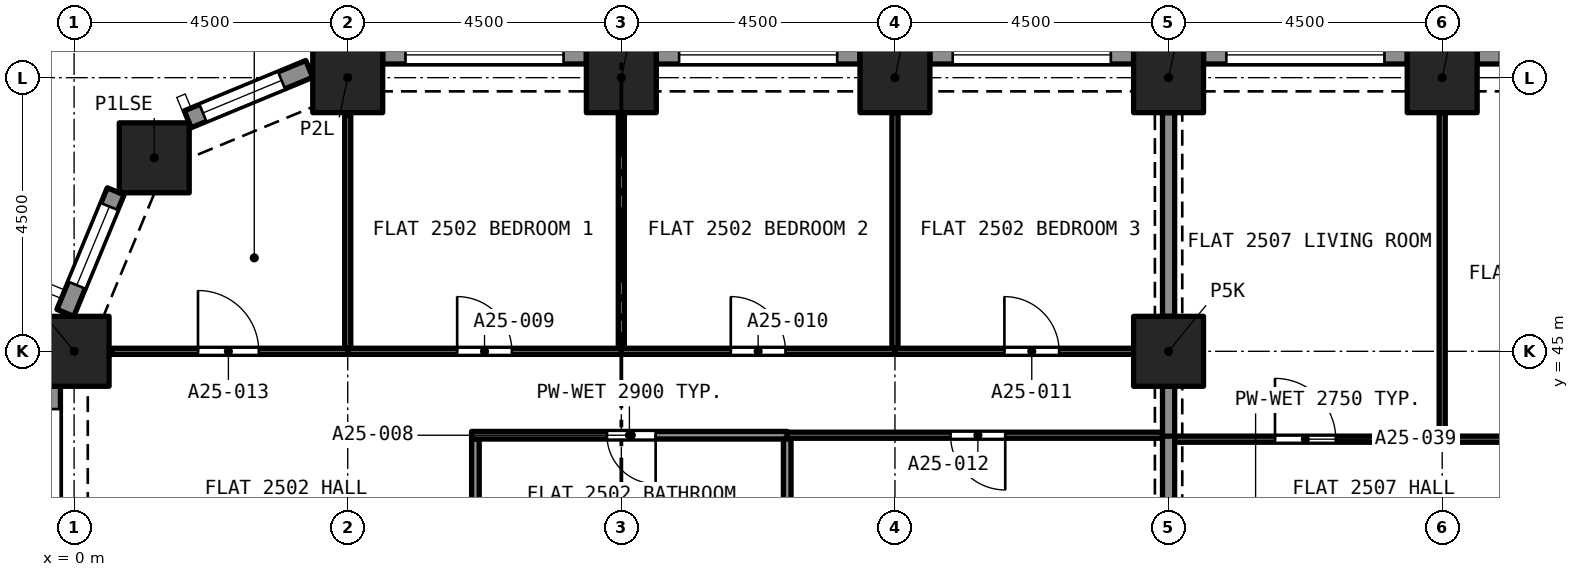
"""IFC4 building model, lengths in metres.
Left out: names, types, materials, properties, quantities, classifications, styles, units other than length and angle.
Written with IfcOpenShell. Run it as: python <this file> out.ifc"""

import sys

from ifc_helpers import new_model, si_unit, direction, frame, frame_2d, origin, origin_2d, place, context, subcontext, project, spatial, rectangle, extrude, element, fill, save


model = new_model("IFC4")
c1 = context("Model", 3, precision=1e-05, world=origin(), true_north=direction((0.0, 1.0)))
c2 = subcontext(c1, "Body", "Model", "MODEL_VIEW")
j1 = project(units=[si_unit("LENGTHUNIT", "METRE"), si_unit("PLANEANGLEUNIT", "RADIAN")], contexts=[c1])
p1 = place(None, origin())
s1 = spatial("IfcSite", under=j1, at=p1, CompositionType="ELEMENT")
p2 = place(p1, origin())
s2 = spatial("IfcBuilding", under=s1, at=p2, CompositionType="ELEMENT")
p3 = place(p2, frame((0.0, 0.0, 92.8)))
s3 = spatial("IfcBuildingStorey", under=s2, at=p3, CompositionType="ELEMENT", Elevation=92.8)
for number, where, z_axis, x_axis in (
    (1, (0.0, 45.0, 0.0), (0.0, 0.0, 1.0), (1.0, 0.0, 0.0)),
    (2, (18.0, 45.0, 0.0), (0.0, 0.0, 1.0), (1.0, 0.0, 0.0)),
    (3, (1.318, 48.182, 0.0), (0.0, 0.0, 1.0), (1.0, 0.0, 0.0)),
    (4, (4.5, 49.5, 0.0), (0.0, 0.0, 1.0), (1.0, 0.0, 0.0)),
    (5, (9.0, 49.5, 0.0), (0.0, 0.0, 1.0), (1.0, 0.0, 0.0)),
    (6, (13.5, 49.5, 0.0), (0.0, 0.0, 1.0), (1.0, 0.0, 0.0)),
    (7, (18.0, 49.5, 0.0), (0.0, 0.0, 1.0), (1.0, 0.0, 0.0)),
    (8, (22.5, 49.5, 0.0), (0.0, 0.0, 1.0), (1.0, 0.0, 0.0)),
):
    element("IfcColumn", number, at=place(p3, frame(where, z_axis=z_axis, x_axis=x_axis)), inside=s3, PredefinedType="COLUMN", context=c2, shape_type="SweptSolid", body=[
        extrude(rectangle(XDim=1.15, YDim=1.15, at=origin_2d()), origin(), (0.0, 0.0, 1.0), 3.2),
    ])
p4 = place(p3, frame((23.075, 49.875, 0.0), z_axis=(0.0, 0.0, 1.0), x_axis=(1.0, 0.0, 0.0)))
e9 = element("IfcWall", 9, at=p4, inside=s3, PredefinedType="SOLIDWALL", context=c2, shape_type="SweptSolid", body=[
    extrude(rectangle(XDim=3.35, YDim=0.3, at=frame_2d((1.675, 0.0))), origin(), (0.0, 0.0, 1.0), 3.2),
])
p5 = place(p4, frame((0.375, 0.0, 0.45)))
e10 = element("IfcOpeningElement", 10, at=p5, cuts=e9, PredefinedType="OPENING", context=c2, shape_type="SweptSolid", body=[
    extrude(rectangle(XDim=2.6, YDim=1.95, at=frame_2d((1.3, 0.975))), frame((0.0, 0.16, 0.0), z_axis=(0.0, -1.0, 0.0), x_axis=(1.0, 0.0, 0.0)), (0.0, 0.0, 1.0), 0.32),
])
p6 = place(p3, frame((18.575, 49.875, 0.0), z_axis=(0.0, 0.0, 1.0), x_axis=(1.0, 0.0, 0.0)))
e11 = element("IfcWall", 11, at=p6, inside=s3, PredefinedType="SOLIDWALL", context=c2, shape_type="SweptSolid", body=[
    extrude(rectangle(XDim=3.35, YDim=0.3, at=frame_2d((1.675, 0.0))), origin(), (0.0, 0.0, 1.0), 3.2),
])
p7 = place(p6, frame((0.375, 0.0, 0.45)))
e12 = element("IfcOpeningElement", 12, at=p7, cuts=e11, PredefinedType="OPENING", context=c2, shape_type="SweptSolid", body=[
    extrude(rectangle(XDim=2.6, YDim=1.95, at=frame_2d((1.3, 0.975))), frame((0.0, 0.16, 0.0), z_axis=(0.0, -1.0, 0.0), x_axis=(1.0, 0.0, 0.0)), (0.0, 0.0, 1.0), 0.32),
])
p8 = place(p3, frame((14.075, 49.875, 0.0), z_axis=(0.0, 0.0, 1.0), x_axis=(1.0, 0.0, 0.0)))
e13 = element("IfcWall", 13, at=p8, inside=s3, PredefinedType="SOLIDWALL", context=c2, shape_type="SweptSolid", body=[
    extrude(rectangle(XDim=3.35, YDim=0.3, at=frame_2d((1.675, 0.0))), origin(), (0.0, 0.0, 1.0), 3.2),
])
p9 = place(p8, frame((0.375, 0.0, 0.45)))
e14 = element("IfcOpeningElement", 14, at=p9, cuts=e13, PredefinedType="OPENING", context=c2, shape_type="SweptSolid", body=[
    extrude(rectangle(XDim=2.6, YDim=1.95, at=frame_2d((1.3, 0.975))), frame((0.0, 0.16, 0.0), z_axis=(0.0, -1.0, 0.0), x_axis=(1.0, 0.0, 0.0)), (0.0, 0.0, 1.0), 0.32),
])
p10 = place(p3, frame((9.575, 49.875, 0.0), z_axis=(0.0, 0.0, 1.0), x_axis=(1.0, 0.0, 0.0)))
e15 = element("IfcWall", 15, at=p10, inside=s3, PredefinedType="SOLIDWALL", context=c2, shape_type="SweptSolid", body=[
    extrude(rectangle(XDim=3.35, YDim=0.3, at=frame_2d((1.675, 0.0))), origin(), (0.0, 0.0, 1.0), 3.2),
])
p11 = place(p10, frame((0.375, 0.0, 0.45)))
e16 = element("IfcOpeningElement", 16, at=p11, cuts=e15, PredefinedType="OPENING", context=c2, shape_type="SweptSolid", body=[
    extrude(rectangle(XDim=2.6, YDim=1.95, at=frame_2d((1.3, 0.975))), frame((0.0, 0.16, 0.0), z_axis=(0.0, -1.0, 0.0), x_axis=(1.0, 0.0, 0.0)), (0.0, 0.0, 1.0), 0.32),
])
p12 = place(p3, frame((5.075, 49.875, 0.0), z_axis=(0.0, 0.0, 1.0), x_axis=(1.0, 0.0, 0.0)))
e17 = element("IfcWall", 17, at=p12, inside=s3, PredefinedType="SOLIDWALL", context=c2, shape_type="SweptSolid", body=[
    extrude(rectangle(XDim=3.35, YDim=0.3, at=frame_2d((1.675, 0.0))), origin(), (0.0, 0.0, 1.0), 3.2),
])
p13 = place(p12, frame((0.375, 0.0, 0.45)))
e18 = element("IfcOpeningElement", 18, at=p13, cuts=e17, PredefinedType="OPENING", context=c2, shape_type="SweptSolid", body=[
    extrude(rectangle(XDim=2.6, YDim=1.95, at=frame_2d((1.3, 0.975))), frame((0.0, 0.16, 0.0), z_axis=(0.0, -1.0, 0.0), x_axis=(1.0, 0.0, 0.0)), (0.0, 0.0, 1.0), 0.32),
])
p14 = place(p3, frame((1.869, 48.816, 0.0), z_axis=(0.0, 0.0, 1.0), x_axis=(0.923862802911, 0.382723818695, 0.0)))
e19 = element("IfcWall", 19, at=p14, inside=s3, PredefinedType="SOLIDWALL", context=c2, shape_type="SweptSolid", body=[
    extrude(rectangle(XDim=2.164, YDim=0.3, at=frame_2d((1.082, 0.0))), origin(), (0.0, 0.0, 1.0), 3.2),
])
p15 = place(p14, frame((0.271, 0.0, 0.45)))
e20 = element("IfcOpeningElement", 20, at=p15, cuts=e19, PredefinedType="OPENING", context=c2, shape_type="SweptSolid", body=[
    extrude(rectangle(XDim=1.4, YDim=1.95, at=frame_2d((0.7, 0.975))), frame((0.0, 0.16, 0.0), z_axis=(0.0, -1.0, 0.0), x_axis=(1.0, 0.0, 0.0)), (0.0, 0.0, 1.0), 0.32),
])
p16 = place(p3, frame((-0.144, 45.632, 0.0), z_axis=(0.0, 0.0, 1.0), x_axis=(0.382723818695, 0.923862802911, 0.0)))
e21 = element("IfcWall", 21, at=p16, inside=s3, PredefinedType="SOLIDWALL", context=c2, shape_type="SweptSolid", body=[
    extrude(rectangle(XDim=2.164, YDim=0.3, at=frame_2d((1.082, 0.0))), origin(), (0.0, 0.0, 1.0), 3.2),
])
p17 = place(p16, frame((0.493, 0.0, 0.45)))
e22 = element("IfcOpeningElement", 22, at=p17, cuts=e21, PredefinedType="OPENING", context=c2, shape_type="SweptSolid", body=[
    extrude(rectangle(XDim=1.4, YDim=1.95, at=frame_2d((0.7, 0.975))), frame((0.0, 0.16, 0.0), z_axis=(0.0, -1.0, 0.0), x_axis=(1.0, 0.0, 0.0)), (0.0, 0.0, 1.0), 0.32),
])
p18 = place(p3, frame((-0.375, 41.075, 0.0), z_axis=(0.0, 0.0, 1.0), x_axis=(0.0, 1.0, 0.0)))
e23 = element("IfcWall", 23, at=p18, inside=s3, PredefinedType="SOLIDWALL", context=c2, shape_type="SweptSolid", body=[
    extrude(rectangle(XDim=3.35, YDim=0.3, at=frame_2d((1.675, 0.0))), origin(), (0.0, 0.0, 1.0), 3.2),
])
p19 = place(p18, frame((0.375, 0.0, 0.45)))
e24 = element("IfcOpeningElement", 24, at=p19, cuts=e23, PredefinedType="OPENING", context=c2, shape_type="SweptSolid", body=[
    extrude(rectangle(XDim=2.6, YDim=1.95, at=frame_2d((1.3, 0.975))), frame((0.0, 0.16, 0.0), z_axis=(0.0, -1.0, 0.0), x_axis=(1.0, 0.0, 0.0)), (0.0, 0.0, 1.0), 0.32),
])
p20 = place(p3, frame((6.6, 40.35, 0.0), z_axis=(0.0, 0.0, 1.0), x_axis=(0.0, 1.0, 0.0)))
e25 = element("IfcWall", 25, at=p20, inside=s3, PredefinedType="PARTITIONING", context=c2, shape_type="SweptSolid", body=[
    extrude(rectangle(XDim=3.208, YDim=0.125, at=frame_2d((1.604, 0.0))), origin(), (0.0, 0.0, 1.0), 2.9),
])
p21 = place(p3, frame((11.728, 43.62, 0.0), z_axis=(0.0, 0.0, 1.0), x_axis=(-1.0, 0.0, 0.0)))
e26 = element("IfcWall", 26, at=p21, inside=s3, PredefinedType="PARTITIONING", context=c2, shape_type="SweptSolid", body=[
    extrude(rectangle(XDim=5.19, YDim=0.125, at=frame_2d((2.595, 0.0))), origin(), (0.0, 0.0, 1.0), 2.9),
])
p22 = place(p21, frame((2.164, 0.0, 0.0)))
e27 = element("IfcOpeningElement", 27, at=p22, cuts=e26, PredefinedType="OPENING", context=c2, shape_type="SweptSolid", body=[
    extrude(rectangle(XDim=0.8, YDim=2.1, at=frame_2d((0.4, 1.05))), frame((0.0, 0.073, 0.0), z_axis=(0.0, -1.0, 0.0), x_axis=(1.0, 0.0, 0.0)), (0.0, 0.0, 1.0), 0.145),
])
p23 = place(p3, frame((11.728, 40.35, 0.0), z_axis=(0.0, 0.0, 1.0), x_axis=(0.0, 1.0, 0.0)))
e28 = element("IfcWall", 28, at=p23, inside=s3, PredefinedType="PARTITIONING", context=c2, shape_type="SweptSolid", body=[
    extrude(rectangle(XDim=3.208, YDim=0.125, at=frame_2d((1.604, 0.0))), origin(), (0.0, 0.0, 1.0), 2.9),
])
p24 = place(p3, frame((9.0, 45.05, 0.0), z_axis=(0.0, 0.0, 1.0), x_axis=(0.0, 1.0, 0.0)))
e29 = element("IfcWall", 29, at=p24, inside=s3, PredefinedType="PARTITIONING", context=c2, shape_type="SweptSolid", body=[
    extrude(rectangle(XDim=3.875, YDim=0.1, at=frame_2d((1.938, 0.0))), origin(), (0.0, 0.0, 1.0), 2.9),
])
p25 = place(p3, frame((4.5, 45.0, 0.0), z_axis=(0.0, 0.0, 1.0), x_axis=(1.0, 0.0, 0.0)))
e30 = element("IfcWall", 30, at=p25, inside=s3, PredefinedType="PARTITIONING", context=c2, shape_type="SweptSolid", body=[
    extrude(rectangle(XDim=4.5, YDim=0.1, at=frame_2d((2.25, 0.0))), origin(), (0.0, 0.0, 1.0), 2.9),
])
p26 = place(p25, frame((1.8, 0.0, 0.0)))
e31 = element("IfcOpeningElement", 31, at=p26, cuts=e30, PredefinedType="OPENING", context=c2, shape_type="SweptSolid", body=[
    extrude(rectangle(XDim=0.9, YDim=2.1, at=frame_2d((0.45, 1.05))), frame((0.0, 0.06, 0.0), z_axis=(0.0, -1.0, 0.0), x_axis=(1.0, 0.0, 0.0)), (0.0, 0.0, 1.0), 0.12),
])
p27 = place(p3, frame((4.5, 45.05, 0.0), z_axis=(0.0, 0.0, 1.0), x_axis=(0.0, 1.0, 0.0)))
e32 = element("IfcWall", 32, at=p27, inside=s3, PredefinedType="PARTITIONING", context=c2, shape_type="SweptSolid", body=[
    extrude(rectangle(XDim=3.828, YDim=0.1, at=frame_2d((1.914, 0.0))), origin(), (0.0, 0.0, 1.0), 2.9),
])
p28 = place(p3, frame((13.5, 45.05, 0.0), z_axis=(0.0, 0.0, 1.0), x_axis=(0.0, 1.0, 0.0)))
e33 = element("IfcWall", 33, at=p28, inside=s3, PredefinedType="PARTITIONING", context=c2, shape_type="SweptSolid", body=[
    extrude(rectangle(XDim=3.875, YDim=0.1, at=frame_2d((1.938, 0.0))), origin(), (0.0, 0.0, 1.0), 2.9),
])
p29 = place(p3, frame((9.0, 45.0, 0.0), z_axis=(0.0, 0.0, 1.0), x_axis=(1.0, 0.0, 0.0)))
e34 = element("IfcWall", 34, at=p29, inside=s3, PredefinedType="PARTITIONING", context=c2, shape_type="SweptSolid", body=[
    extrude(rectangle(XDim=4.5, YDim=0.1, at=frame_2d((2.25, 0.0))), origin(), (0.0, 0.0, 1.0), 2.9),
])
p30 = place(p29, frame((1.8, 0.0, 0.0)))
e35 = element("IfcOpeningElement", 35, at=p30, cuts=e34, PredefinedType="OPENING", context=c2, shape_type="SweptSolid", body=[
    extrude(rectangle(XDim=0.9, YDim=2.1, at=frame_2d((0.45, 1.05))), frame((0.0, 0.06, 0.0), z_axis=(0.0, -1.0, 0.0), x_axis=(1.0, 0.0, 0.0)), (0.0, 0.0, 1.0), 0.12),
])
p31 = place(p3, frame((13.5, 45.0, 0.0), z_axis=(0.0, 0.0, 1.0), x_axis=(1.0, 0.0, 0.0)))
e36 = element("IfcWall", 36, at=p31, inside=s3, PredefinedType="PARTITIONING", context=c2, shape_type="SweptSolid", body=[
    extrude(rectangle(XDim=3.925, YDim=0.1, at=frame_2d((1.962, 0.0))), origin(), (0.0, 0.0, 1.0), 2.9),
])
p32 = place(p31, frame((1.8, 0.0, 0.0)))
e37 = element("IfcOpeningElement", 37, at=p32, cuts=e36, PredefinedType="OPENING", context=c2, shape_type="SweptSolid", body=[
    extrude(rectangle(XDim=0.9, YDim=2.1, at=frame_2d((0.45, 1.05))), frame((0.0, 0.06, 0.0), z_axis=(0.0, -1.0, 0.0), x_axis=(1.0, 0.0, 0.0)), (0.0, 0.0, 1.0), 0.12),
])
p33 = place(p3, frame((18.0, 45.575, 0.0), z_axis=(0.0, 0.0, 1.0), x_axis=(0.0, 1.0, 0.0)))
e38 = element("IfcWall", 38, at=p33, inside=s3, PredefinedType="PARTITIONING", context=c2, shape_type="SweptSolid", body=[
    extrude(rectangle(XDim=3.35, YDim=0.2, at=frame_2d((1.675, 0.0))), origin(), (0.0, 0.0, 1.0), 2.38),
])
p34 = place(p3, frame((17.9, 43.62, 0.0), z_axis=(0.0, 0.0, 1.0), x_axis=(-1.0, 0.0, 0.0)))
e39 = element("IfcWall", 39, at=p34, inside=s3, PredefinedType="PARTITIONING", context=c2, shape_type="SweptSolid", body=[
    extrude(rectangle(XDim=6.172, YDim=0.1, at=frame_2d((3.086, 0.0))), origin(), (0.0, 0.0, 1.0), 2.9),
])
p35 = place(p34, frame((2.586, 0.0, 0.0)))
e40 = element("IfcOpeningElement", 40, at=p35, cuts=e39, PredefinedType="OPENING", context=c2, shape_type="SweptSolid", body=[
    extrude(rectangle(XDim=0.9, YDim=2.1, at=frame_2d((0.45, 1.05))), frame((0.0, 0.06, 0.0), z_axis=(0.0, -1.0, 0.0), x_axis=(1.0, 0.0, 0.0)), (0.0, 0.0, 1.0), 0.12),
])
p36 = place(p3, frame((0.622, 45.0, 0.0), z_axis=(0.0, 0.0, 1.0), x_axis=(1.0, 0.0, 0.0)))
e41 = element("IfcWall", 41, at=p36, inside=s3, PredefinedType="PARTITIONING", context=c2, shape_type="SweptSolid", body=[
    extrude(rectangle(XDim=3.878, YDim=0.1, at=frame_2d((1.939, 0.0))), origin(), (0.0, 0.0, 1.0), 2.9),
])
p37 = place(p36, frame((1.415, 0.0, 0.0)))
e42 = element("IfcOpeningElement", 42, at=p37, cuts=e41, PredefinedType="OPENING", context=c2, shape_type="SweptSolid", body=[
    extrude(rectangle(XDim=1.0, YDim=2.1, at=frame_2d((0.5, 1.05))), frame((0.0, 0.06, 0.0), z_axis=(0.0, -1.0, 0.0), x_axis=(1.0, 0.0, 0.0)), (0.0, 0.0, 1.0), 0.12),
])
p38 = place(p3, frame((18.0, 43.57, 0.0), z_axis=(0.0, 0.0, 1.0), x_axis=(0.0, 1.0, 0.0)))
e43 = element("IfcWall", 43, at=p38, inside=s3, PredefinedType="PARTITIONING", context=c2, shape_type="SweptSolid", body=[
    extrude(rectangle(XDim=0.855, YDim=0.2, at=frame_2d((0.427, 0.0))), origin(), (0.0, 0.0, 1.0), 2.38),
])
p39 = place(p3, frame((18.0, 41.075, 0.0), z_axis=(0.0, 0.0, 1.0), x_axis=(0.0, 1.0, 0.0)))
e44 = element("IfcWall", 44, at=p39, inside=s3, PredefinedType="PARTITIONING", context=c2, shape_type="SweptSolid", body=[
    extrude(rectangle(XDim=2.53, YDim=0.2, at=frame_2d((1.265, 0.0))), origin(), (0.0, 0.0, 1.0), 2.38),
])
p40 = place(p3, frame((22.5, 43.555, 0.0), z_axis=(0.0, 0.0, 1.0), x_axis=(1.0, 0.0, 0.0)))
e45 = element("IfcWall", 45, at=p40, inside=s3, PredefinedType="PARTITIONING", context=c2, shape_type="SweptSolid", body=[
    extrude(rectangle(XDim=4.5, YDim=0.1, at=frame_2d((2.25, 0.0))), origin(), (0.0, 0.0, 1.0), 2.75),
])
p41 = place(p40, frame((1.8, 0.0, 0.0)))
e46 = element("IfcOpeningElement", 46, at=p41, cuts=e45, PredefinedType="OPENING", context=c2, shape_type="SweptSolid", body=[
    extrude(rectangle(XDim=0.9, YDim=2.1, at=frame_2d((0.45, 1.05))), frame((0.0, 0.06, 0.0), z_axis=(0.0, -1.0, 0.0), x_axis=(1.0, 0.0, 0.0)), (0.0, 0.0, 1.0), 0.12),
])
p42 = place(p3, frame((22.5, 43.605, 0.0), z_axis=(0.0, 0.0, 1.0), x_axis=(0.0, 1.0, 0.0)))
e47 = element("IfcWall", 47, at=p42, inside=s3, PredefinedType="PARTITIONING", context=c2, shape_type="SweptSolid", body=[
    extrude(rectangle(XDim=5.32, YDim=0.1, at=frame_2d((2.66, 0.0))), origin(), (0.0, 0.0, 1.0), 2.75),
])
p43 = place(p3, frame((18.1, 43.555, 0.0), z_axis=(0.0, 0.0, 1.0), x_axis=(1.0, 0.0, 0.0)))
e48 = element("IfcWall", 48, at=p43, inside=s3, PredefinedType="PARTITIONING", context=c2, shape_type="SweptSolid", body=[
    extrude(rectangle(XDim=4.4, YDim=0.1, at=frame_2d((2.2, 0.0))), origin(), (0.0, 0.0, 1.0), 2.75),
])
p44 = place(p43, frame((1.65, 0.0, 0.0)))
e49 = element("IfcOpeningElement", 49, at=p44, cuts=e48, PredefinedType="OPENING", context=c2, shape_type="SweptSolid", body=[
    extrude(rectangle(XDim=1.0, YDim=2.1, at=frame_2d((0.5, 1.05))), frame((0.0, 0.06, 0.0), z_axis=(0.0, -1.0, 0.0), x_axis=(1.0, 0.0, 0.0)), (0.0, 0.0, 1.0), 0.12),
])
p45 = place(p7, origin())
e50 = element("IfcWindow", 50, at=p45, inside=s3, PartitioningType="SINGLE_PANEL", PredefinedType="WINDOW", context=c2, shape_type="SweptSolid", body=[
    extrude(rectangle(XDim=2.6, YDim=1.95, at=frame_2d((1.3, 0.975))), frame((0.0, 0.03, 0.0), z_axis=(0.0, -1.0, 0.0), x_axis=(1.0, 0.0, 0.0)), (0.0, 0.0, 1.0), 0.06),
])
fill(e12, e50)
p46 = place(p9, origin())
e51 = element("IfcWindow", 51, at=p46, inside=s3, PartitioningType="SINGLE_PANEL", PredefinedType="WINDOW", context=c2, shape_type="SweptSolid", body=[
    extrude(rectangle(XDim=2.6, YDim=1.95, at=frame_2d((1.3, 0.975))), frame((0.0, 0.03, 0.0), z_axis=(0.0, -1.0, 0.0), x_axis=(1.0, 0.0, 0.0)), (0.0, 0.0, 1.0), 0.06),
])
fill(e14, e51)
p47 = place(p11, origin())
e52 = element("IfcWindow", 52, at=p47, inside=s3, PartitioningType="SINGLE_PANEL", PredefinedType="WINDOW", context=c2, shape_type="SweptSolid", body=[
    extrude(rectangle(XDim=2.6, YDim=1.95, at=frame_2d((1.3, 0.975))), frame((0.0, 0.03, 0.0), z_axis=(0.0, -1.0, 0.0), x_axis=(1.0, 0.0, 0.0)), (0.0, 0.0, 1.0), 0.06),
])
fill(e16, e52)
p48 = place(p13, origin())
e53 = element("IfcWindow", 53, at=p48, inside=s3, PartitioningType="SINGLE_PANEL", PredefinedType="WINDOW", context=c2, shape_type="SweptSolid", body=[
    extrude(rectangle(XDim=2.6, YDim=1.95, at=frame_2d((1.3, 0.975))), frame((0.0, 0.03, 0.0), z_axis=(0.0, -1.0, 0.0), x_axis=(1.0, 0.0, 0.0)), (0.0, 0.0, 1.0), 0.06),
])
fill(e18, e53)
p49 = place(p15, origin())
e54 = element("IfcWindow", 54, at=p49, inside=s3, PartitioningType="SINGLE_PANEL", PredefinedType="WINDOW", context=c2, shape_type="SweptSolid", body=[
    extrude(rectangle(XDim=1.4, YDim=1.95, at=frame_2d((0.7, 0.975))), frame((0.0, 0.03, 0.0), z_axis=(0.0, -1.0, 0.0), x_axis=(1.0, 0.0, 0.0)), (0.0, 0.0, 1.0), 0.06),
])
fill(e20, e54)
p50 = place(p17, origin())
e55 = element("IfcWindow", 55, at=p50, inside=s3, PartitioningType="SINGLE_PANEL", PredefinedType="WINDOW", context=c2, shape_type="SweptSolid", body=[
    extrude(rectangle(XDim=1.4, YDim=1.95, at=frame_2d((0.7, 0.975))), frame((0.0, 0.03, 0.0), z_axis=(0.0, -1.0, 0.0), x_axis=(1.0, 0.0, 0.0)), (0.0, 0.0, 1.0), 0.06),
])
fill(e22, e55)
p51 = place(p19, origin())
e56 = element("IfcWindow", 56, at=p51, inside=s3, PartitioningType="SINGLE_PANEL", PredefinedType="WINDOW", context=c2, shape_type="SweptSolid", body=[
    extrude(rectangle(XDim=2.6, YDim=1.95, at=frame_2d((1.3, 0.975))), frame((0.0, 0.03, 0.0), z_axis=(0.0, -1.0, 0.0), x_axis=(1.0, 0.0, 0.0)), (0.0, 0.0, 1.0), 0.06),
])
fill(e24, e56)
p52 = place(p22, origin())
e57 = element("IfcDoor", 57, at=p52, inside=s3, OperationType="SINGLE_SWING_LEFT", PredefinedType="DOOR", context=c2, shape_type="SweptSolid", body=[
    extrude(rectangle(XDim=0.8, YDim=2.1, at=frame_2d((0.4, 1.05))), frame((0.0, 0.025, 0.0), z_axis=(0.0, -1.0, 0.0), x_axis=(1.0, 0.0, 0.0)), (0.0, 0.0, 1.0), 0.05),
])
fill(e27, e57)
p53 = place(p26, origin())
e58 = element("IfcDoor", 58, at=p53, inside=s3, OperationType="SINGLE_SWING_RIGHT", PredefinedType="DOOR", context=c2, shape_type="SweptSolid", body=[
    extrude(rectangle(XDim=0.9, YDim=2.1, at=frame_2d((0.45, 1.05))), frame((0.0, 0.025, 0.0), z_axis=(0.0, -1.0, 0.0), x_axis=(1.0, 0.0, 0.0)), (0.0, 0.0, 1.0), 0.05),
])
fill(e31, e58)
p54 = place(p30, origin())
e59 = element("IfcDoor", 59, at=p54, inside=s3, OperationType="SINGLE_SWING_LEFT", PredefinedType="DOOR", context=c2, shape_type="SweptSolid", body=[
    extrude(rectangle(XDim=0.9, YDim=2.1, at=frame_2d((0.45, 1.05))), frame((0.0, 0.025, 0.0), z_axis=(0.0, -1.0, 0.0), x_axis=(1.0, 0.0, 0.0)), (0.0, 0.0, 1.0), 0.05),
])
fill(e35, e59)
p55 = place(p32, origin())
e60 = element("IfcDoor", 60, at=p55, inside=s3, OperationType="SINGLE_SWING_RIGHT", PredefinedType="DOOR", context=c2, shape_type="SweptSolid", body=[
    extrude(rectangle(XDim=0.9, YDim=2.1, at=frame_2d((0.45, 1.05))), frame((0.0, 0.025, 0.0), z_axis=(0.0, -1.0, 0.0), x_axis=(1.0, 0.0, 0.0)), (0.0, 0.0, 1.0), 0.05),
])
fill(e37, e60)
p56 = place(p35, origin())
e61 = element("IfcDoor", 61, at=p56, inside=s3, OperationType="SINGLE_SWING_LEFT", PredefinedType="DOOR", context=c2, shape_type="SweptSolid", body=[
    extrude(rectangle(XDim=0.9, YDim=2.1, at=frame_2d((0.45, 1.05))), frame((0.0, 0.025, 0.0), z_axis=(0.0, -1.0, 0.0), x_axis=(1.0, 0.0, 0.0)), (0.0, 0.0, 1.0), 0.05),
])
fill(e40, e61)
p57 = place(p37, origin())
e62 = element("IfcDoor", 62, at=p57, inside=s3, OperationType="SINGLE_SWING_LEFT", PredefinedType="DOOR", context=c2, shape_type="SweptSolid", body=[
    extrude(rectangle(XDim=1.0, YDim=2.1, at=frame_2d((0.5, 1.05))), frame((0.0, 0.025, 0.0), z_axis=(0.0, -1.0, 0.0), x_axis=(1.0, 0.0, 0.0)), (0.0, 0.0, 1.0), 0.05),
])
fill(e42, e62)
p58 = place(p44, origin())
e63 = element("IfcDoor", 63, at=p58, inside=s3, OperationType="SINGLE_SWING_LEFT", PredefinedType="DOOR", context=c2, shape_type="SweptSolid", body=[
    extrude(rectangle(XDim=1.0, YDim=2.1, at=frame_2d((0.5, 1.05))), frame((0.0, 0.025, 0.0), z_axis=(0.0, -1.0, 0.0), x_axis=(1.0, 0.0, 0.0)), (0.0, 0.0, 1.0), 0.05),
])
fill(e49, e63)
save(model, sys.argv[1])
